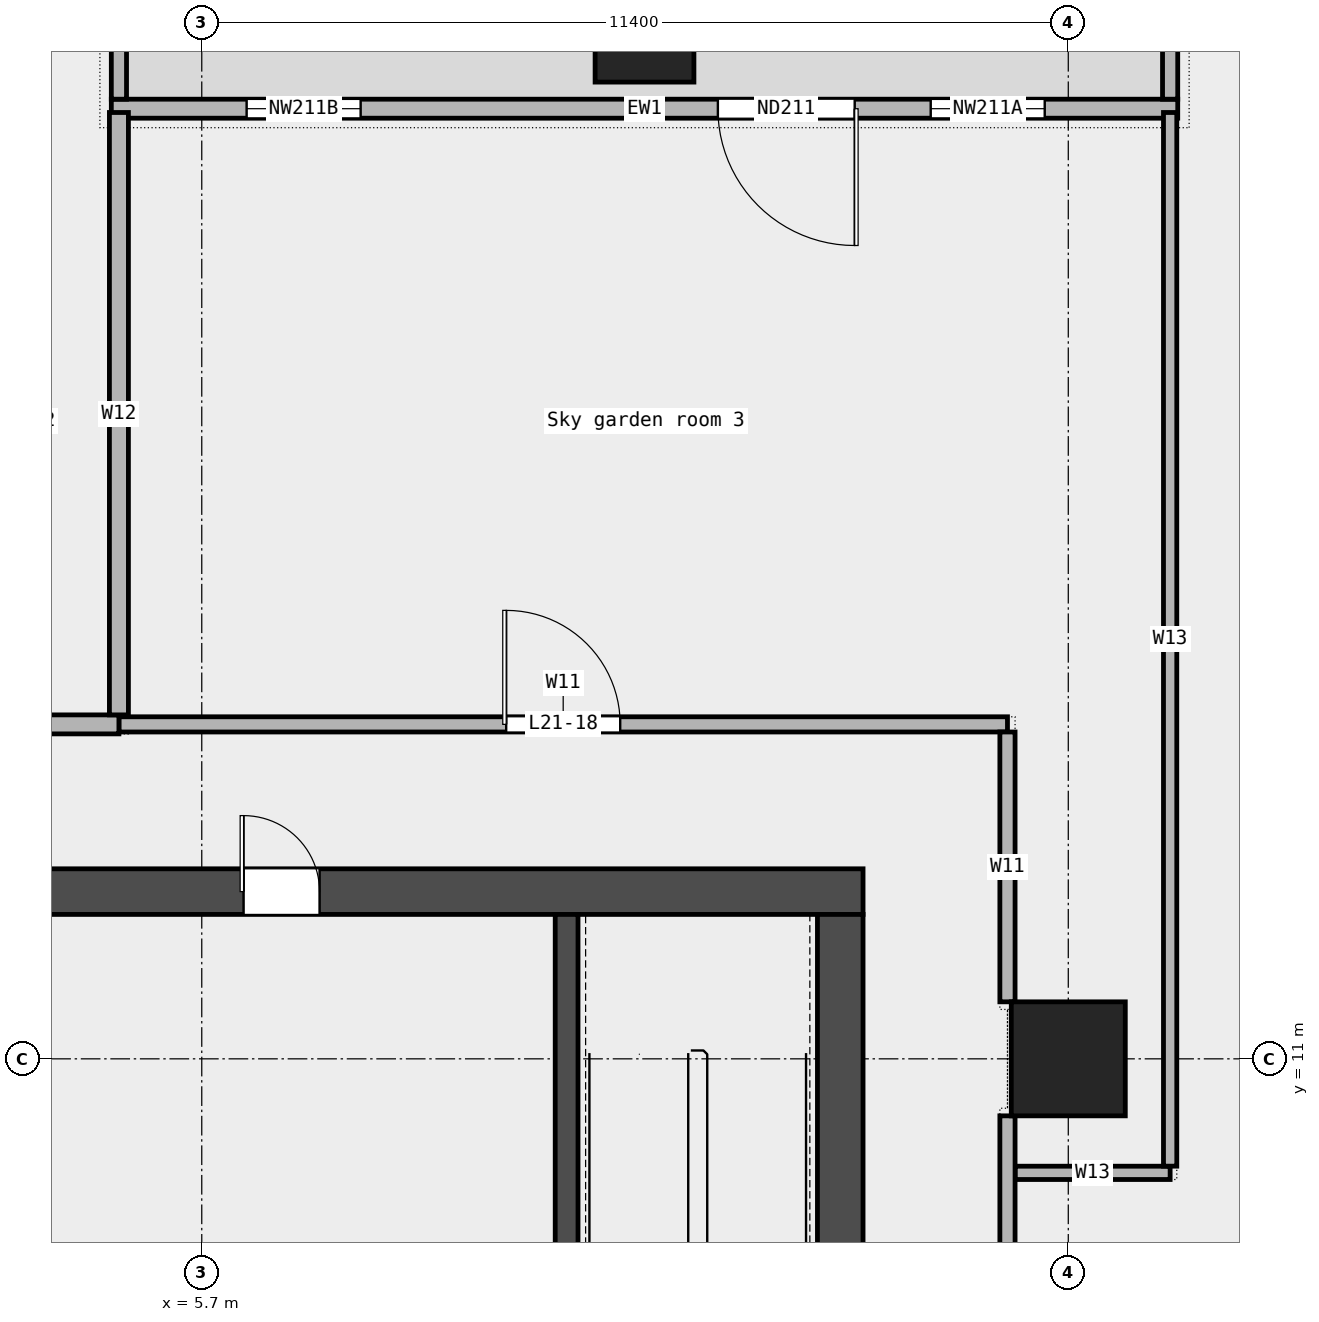
"""IFC4 building model, lengths in metres.
Left out: names, types, materials, properties, quantities, classifications, styles, units other than length and angle.
Written with IfcOpenShell. Run it as: python <this file> out.ifc"""

import sys

from ifc_helpers import new_model, si_unit, direction, frame, frame_2d, origin, origin_2d, place, context, subcontext, project, spatial, rectangle, extrude, element, fill, save


model = new_model("IFC4")
c1 = context("Model", 3, precision=1e-05, world=origin(), true_north=direction((0.0, 1.0)))
c2 = subcontext(c1, "Body", "Model", "MODEL_VIEW")
j1 = project(units=[si_unit("LENGTHUNIT", "METRE"), si_unit("PLANEANGLEUNIT", "RADIAN")], contexts=[c1])
p1 = place(None, origin())
s1 = spatial("IfcSite", under=j1, at=p1, CompositionType="ELEMENT")
p2 = place(p1, origin())
s2 = spatial("IfcBuilding", under=s1, at=p2, CompositionType="ELEMENT")
p3 = place(p2, frame((0.0, 0.0, 108.1)))
s3 = spatial("IfcBuildingStorey", under=s2, at=p3, CompositionType="ELEMENT", Elevation=108.1)
p4 = place(p3, frame((11.525, 24.5, 0.0), z_axis=(0.0, 0.0, 1.0), x_axis=(1.0, 0.0, 0.0)))
e1 = element("IfcColumn", 1, at=p4, inside=s3, PredefinedType="COLUMN", context=c2, shape_type="SweptSolid", body=[
    extrude(rectangle(XDim=1.3, YDim=1.3, at=origin_2d()), origin(), (0.0, 0.0, 1.0), 4.05),
])
p5 = place(p3, frame((17.1, 11.0, 0.0), z_axis=(0.0, 0.0, 1.0), x_axis=(1.0, 0.0, 0.0)))
e2 = element("IfcColumn", 2, at=p5, inside=s3, PredefinedType="COLUMN", context=c2, shape_type="SweptSolid", body=[
    extrude(rectangle(XDim=1.5, YDim=1.5, at=origin_2d()), origin(), (0.0, 0.0, 1.0), 4.05),
])
p6 = place(p3, frame((18.54, 23.5, 0.0), z_axis=(0.0, 0.0, 1.0), x_axis=(-1.0, 0.0, 0.0)))
e3 = element("IfcWall", 3, at=p6, inside=s3, PredefinedType="STANDARD", context=c2, shape_type="SweptSolid", body=[
    extrude(rectangle(XDim=14.03, YDim=0.25, at=frame_2d((7.015, 0.0))), origin(), (0.0, 0.0, 1.0), 4.05),
])
p7 = place(p6, frame((1.75, 0.0, 0.45)))
e4 = element("IfcOpeningElement", 4, at=p7, cuts=e3, PredefinedType="OPENING", context=c2, shape_type="SweptSolid", body=[
    extrude(rectangle(XDim=1.5, YDim=3.0, at=frame_2d((0.75, 1.5))), frame((0.0, 0.137, 0.0), z_axis=(0.0, -1.0, 0.0), x_axis=(1.0, 0.0, 0.0)), (0.0, 0.0, 1.0), 0.274),
])
p8 = place(p6, frame((4.25, 0.0, 0.0)))
e5 = element("IfcOpeningElement", 5, at=p8, cuts=e3, PredefinedType="OPENING", context=c2, shape_type="SweptSolid", body=[
    extrude(rectangle(XDim=1.8, YDim=2.4, at=frame_2d((0.9, 1.2))), frame((0.0, 0.137, 0.0), z_axis=(0.0, -1.0, 0.0), x_axis=(1.0, 0.0, 0.0)), (0.0, 0.0, 1.0), 0.274),
])
p9 = place(p6, frame((10.75, 0.0, 0.45)))
e6 = element("IfcOpeningElement", 6, at=p9, cuts=e3, PredefinedType="OPENING", context=c2, shape_type="SweptSolid", body=[
    extrude(rectangle(XDim=1.5, YDim=3.0, at=frame_2d((0.75, 1.5))), frame((0.0, 0.137, 0.0), z_axis=(0.0, -1.0, 0.0), x_axis=(1.0, 0.0, 0.0)), (0.0, 0.0, 1.0), 0.274),
])
for number, where, z_axis, x_axis in (
    (7, (18.44, 25.5, 0.0), (0.0, 0.0, 1.0), (0.0, -1.0, 0.0)),
    (8, (4.61, 25.5, 0.0), (0.0, 0.0, 1.0), (0.0, -1.0, 0.0)),
):
    element("IfcWall", number, at=place(p3, frame(where, z_axis=z_axis, x_axis=x_axis)), inside=s3, PredefinedType="STANDARD", context=c2, shape_type="SweptSolid", body=[
        extrude(rectangle(XDim=1.875, YDim=0.2, at=frame_2d((0.938, 0.0))), origin(), (0.0, 0.0, 1.0), 4.05),
    ])
p10 = place(p3, frame((16.4, 9.5, 0.0), z_axis=(0.0, 0.0, 1.0), x_axis=(1.0, 0.0, 0.0)))
e9 = element("IfcWall", 9, at=p10, inside=s3, PredefinedType="PARTITIONING", context=c2, shape_type="SweptSolid", body=[
    extrude(rectangle(XDim=2.04, YDim=0.175, at=frame_2d((1.02, 0.0))), origin(), (0.0, 0.0, 1.0), 4.05),
])
p11 = place(p3, frame((4.61, 15.4, 0.0), z_axis=(0.0, 0.0, 1.0), x_axis=(1.0, 0.0, 0.0)))
e10 = element("IfcWall", 10, at=p11, inside=s3, PredefinedType="PARTITIONING", context=c2, shape_type="SweptSolid", body=[
    extrude(rectangle(XDim=11.69, YDim=0.2, at=frame_2d((5.845, 0.0))), origin(), (0.0, 0.0, 1.0), 4.05),
])
p12 = place(p11, frame((5.095, 0.0, 0.0)))
e11 = element("IfcOpeningElement", 11, at=p12, cuts=e10, PredefinedType="OPENING", context=c2, shape_type="SweptSolid", body=[
    extrude(rectangle(XDim=1.5, YDim=2.1, at=frame_2d((0.75, 1.05))), frame((0.0, 0.112, 0.0), z_axis=(0.0, -1.0, 0.0), x_axis=(1.0, 0.0, 0.0)), (0.0, 0.0, 1.0), 0.224),
])
p13 = place(p3, frame((-1.515, 15.4, 0.0), z_axis=(0.0, 0.0, 1.0), x_axis=(1.0, 0.0, 0.0)))
e12 = element("IfcWall", 12, at=p13, inside=s3, PredefinedType="PARTITIONING", context=c2, shape_type="SweptSolid", body=[
    extrude(rectangle(XDim=6.125, YDim=0.25, at=frame_2d((3.062, 0.0))), origin(), (0.0, 0.0, 1.0), 4.05),
])
p14 = place(p13, frame((2.462, 0.0, 0.0)))
e13 = element("IfcOpeningElement", 13, at=p14, cuts=e12, PredefinedType="OPENING", context=c2, shape_type="SweptSolid", body=[
    extrude(rectangle(XDim=1.2, YDim=2.1, at=frame_2d((0.6, 1.05))), frame((0.0, 0.137, 0.0), z_axis=(0.0, -1.0, 0.0), x_axis=(1.0, 0.0, 0.0)), (0.0, 0.0, 1.0), 0.274),
])
p15 = place(p3, frame((4.61, 15.525, 0.0), z_axis=(0.0, 0.0, 1.0), x_axis=(0.0, 1.0, 0.0)))
e14 = element("IfcWall", 14, at=p15, inside=s3, PredefinedType="PARTITIONING", context=c2, shape_type="SweptSolid", body=[
    extrude(rectangle(XDim=7.925, YDim=0.25, at=frame_2d((3.962, 0.0))), origin(), (0.0, 0.0, 1.0), 4.05),
])
p16 = place(p3, frame((16.3, 1.325, 0.0), z_axis=(0.0, 0.0, 1.0), x_axis=(0.0, 1.0, 0.0)))
e15 = element("IfcWall", 15, at=p16, inside=s3, PredefinedType="PARTITIONING", context=c2, shape_type="SweptSolid", body=[
    extrude(rectangle(XDim=8.925, YDim=0.2, at=frame_2d((4.462, 0.0))), origin(), (0.0, 0.0, 1.0), 4.05),
])
p17 = place(p16, frame((3.188, 0.0, 0.0)))
e16 = element("IfcOpeningElement", 16, at=p17, cuts=e15, PredefinedType="OPENING", context=c2, shape_type="SweptSolid", body=[
    extrude(rectangle(XDim=1.8, YDim=2.1, at=frame_2d((0.9, 1.05))), frame((0.0, 0.112, 0.0), z_axis=(0.0, -1.0, 0.0), x_axis=(1.0, 0.0, 0.0)), (0.0, 0.0, 1.0), 0.224),
])
p18 = place(p3, frame((16.3, 11.75, 0.0), z_axis=(0.0, 0.0, 1.0), x_axis=(0.0, 1.0, 0.0)))
e17 = element("IfcWall", 17, at=p18, inside=s3, PredefinedType="PARTITIONING", context=c2, shape_type="SweptSolid", body=[
    extrude(rectangle(XDim=3.55, YDim=0.2, at=frame_2d((1.775, 0.0))), origin(), (0.0, 0.0, 1.0), 4.05),
])
p19 = place(p3, frame((18.44, 9.588, 0.0), z_axis=(0.0, 0.0, 1.0), x_axis=(0.0, 1.0, 0.0)))
e18 = element("IfcWall", 18, at=p19, inside=s3, PredefinedType="PARTITIONING", context=c2, shape_type="SweptSolid", body=[
    extrude(rectangle(XDim=13.862, YDim=0.175, at=frame_2d((6.931, 0.0))), origin(), (0.0, 0.0, 1.0), 4.05),
])
p20 = place(p3, frame((-14.4, 13.2, 0.0), z_axis=(0.0, 0.0, 1.0), x_axis=(1.0, 0.0, 0.0)))
e19 = element("IfcWall", 19, at=p20, inside=s3, PredefinedType="SHEAR", context=c2, shape_type="SweptSolid", body=[
    extrude(rectangle(XDim=28.8, YDim=0.6, at=frame_2d((14.4, 0.0))), origin(), (0.0, 0.0, 1.0), 4.2),
])
p21 = place(p20, frame((6.775, 0.0, 0.0)))
e20 = element("IfcOpeningElement", 20, at=p21, cuts=e19, PredefinedType="OPENING", context=c2, shape_type="SweptSolid", body=[
    extrude(rectangle(XDim=1.0, YDim=2.1, at=frame_2d((0.5, 1.05))), frame((0.0, 0.312, 0.0), z_axis=(0.0, -1.0, 0.0), x_axis=(1.0, 0.0, 0.0)), (0.0, 0.0, 1.0), 0.624),
])
p22 = place(p20, frame((13.525, 0.0, 0.0)))
e21 = element("IfcOpeningElement", 21, at=p22, cuts=e19, PredefinedType="OPENING", context=c2, shape_type="SweptSolid", body=[
    extrude(rectangle(XDim=1.0, YDim=2.1, at=frame_2d((0.5, 1.05))), frame((0.0, 0.312, 0.0), z_axis=(0.0, -1.0, 0.0), x_axis=(1.0, 0.0, 0.0)), (0.0, 0.0, 1.0), 0.624),
])
p23 = place(p20, frame((20.65, 0.0, 0.0)))
e22 = element("IfcOpeningElement", 22, at=p23, cuts=e19, PredefinedType="OPENING", context=c2, shape_type="SweptSolid", body=[
    extrude(rectangle(XDim=1.0, YDim=2.1, at=frame_2d((0.5, 1.05))), frame((0.0, 0.312, 0.0), z_axis=(0.0, -1.0, 0.0), x_axis=(1.0, 0.0, 0.0)), (0.0, 0.0, 1.0), 0.624),
])
p24 = place(p3, frame((14.1, -6.6, 0.0), z_axis=(0.0, 0.0, 1.0), x_axis=(0.0, 1.0, 0.0)))
e23 = element("IfcWall", 23, at=p24, inside=s3, PredefinedType="SHEAR", context=c2, shape_type="SweptSolid", body=[
    extrude(rectangle(XDim=19.5, YDim=0.6, at=frame_2d((9.75, 0.0))), origin(), (0.0, 0.0, 1.0), 4.2),
])
p25 = place(p24, frame((9.3, 0.0, 0.0)))
e24 = element("IfcOpeningElement", 24, at=p25, cuts=e23, PredefinedType="OPENING", context=c2, shape_type="SweptSolid", body=[
    extrude(rectangle(XDim=1.8, YDim=2.1, at=frame_2d((0.9, 1.05))), frame((0.0, 0.312, 0.0), z_axis=(0.0, -1.0, 0.0), x_axis=(1.0, 0.0, 0.0)), (0.0, 0.0, 1.0), 0.624),
])
p26 = place(p3, frame((10.5, 5.25, 0.0), z_axis=(0.0, 0.0, 1.0), x_axis=(0.0, 1.0, 0.0)))
e25 = element("IfcWall", 25, at=p26, inside=s3, PredefinedType="SHEAR", context=c2, shape_type="SweptSolid", body=[
    extrude(rectangle(XDim=7.65, YDim=0.3, at=frame_2d((3.825, 0.0))), origin(), (0.0, 0.0, 1.0), 4.2),
])
p27 = place(p7, origin())
e26 = element("IfcWindow", 26, at=p27, inside=s3, PartitioningType="SINGLE_PANEL", PredefinedType="WINDOW", context=c2, shape_type="SweptSolid", body=[
    extrude(rectangle(XDim=1.5, YDim=3.0, at=frame_2d((0.75, 1.5))), frame((0.0, 0.03, 0.0), z_axis=(0.0, -1.0, 0.0), x_axis=(1.0, 0.0, 0.0)), (0.0, 0.0, 1.0), 0.06),
])
fill(e4, e26)
p28 = place(p8, origin())
e27 = element("IfcDoor", 27, at=p28, inside=s3, OperationType="DOUBLE_DOOR_SINGLE_SWING", PredefinedType="DOOR", context=c2, shape_type="SweptSolid", body=[
    extrude(rectangle(XDim=1.8, YDim=2.4, at=frame_2d((0.9, 1.2))), frame((0.0, 0.025, 0.0), z_axis=(0.0, -1.0, 0.0), x_axis=(1.0, 0.0, 0.0)), (0.0, 0.0, 1.0), 0.05),
])
fill(e5, e27)
p29 = place(p9, origin())
e28 = element("IfcWindow", 28, at=p29, inside=s3, PartitioningType="SINGLE_PANEL", PredefinedType="WINDOW", context=c2, shape_type="SweptSolid", body=[
    extrude(rectangle(XDim=1.5, YDim=3.0, at=frame_2d((0.75, 1.5))), frame((0.0, 0.03, 0.0), z_axis=(0.0, -1.0, 0.0), x_axis=(1.0, 0.0, 0.0)), (0.0, 0.0, 1.0), 0.06),
])
fill(e6, e28)
p30 = place(p12, origin())
e29 = element("IfcDoor", 29, at=p30, inside=s3, OperationType="DOUBLE_DOOR_SINGLE_SWING", PredefinedType="DOOR", context=c2, shape_type="SweptSolid", body=[
    extrude(rectangle(XDim=1.5, YDim=2.1, at=frame_2d((0.75, 1.05))), frame((0.0, 0.025, 0.0), z_axis=(0.0, -1.0, 0.0), x_axis=(1.0, 0.0, 0.0)), (0.0, 0.0, 1.0), 0.05),
])
fill(e11, e29)
p31 = place(p23, origin())
e30 = element("IfcDoor", 30, at=p31, inside=s3, OperationType="SINGLE_SWING_LEFT", PredefinedType="DOOR", context=c2, shape_type="SweptSolid", body=[
    extrude(rectangle(XDim=1.0, YDim=2.1, at=frame_2d((0.5, 1.05))), frame((0.0, 0.025, 0.0), z_axis=(0.0, -1.0, 0.0), x_axis=(1.0, 0.0, 0.0)), (0.0, 0.0, 1.0), 0.05),
])
fill(e22, e30)
save(model, sys.argv[1])
